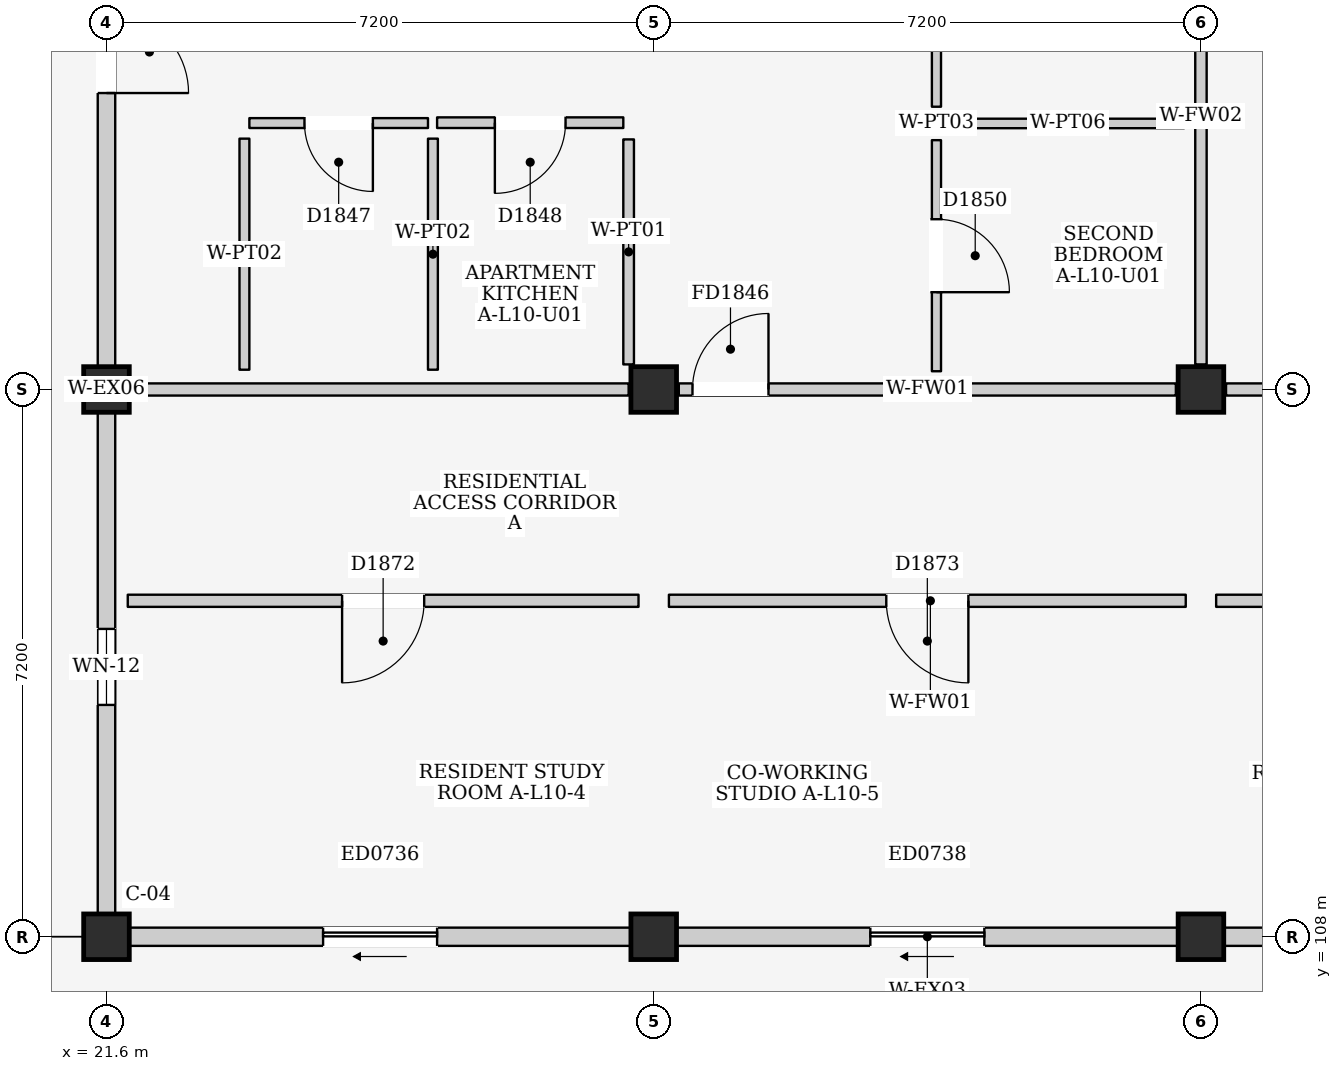
"""IFC4 building model, lengths in metres.
Left out: names, types, materials, properties, quantities, classifications, styles, units other than length and angle.
Written with IfcOpenShell. Run it as: python <this file> out.ifc"""

import sys

from ifc_helpers import new_model, si_unit, direction, frame, frame_2d, origin, origin_2d, place, context, subcontext, project, spatial, rectangle, extrude, element, fill, save


model = new_model("IFC4")
c1 = context("Model", 3, precision=1e-05, world=origin(), true_north=direction((0.0, 1.0)))
c2 = subcontext(c1, "Body", "Model", "MODEL_VIEW")
j1 = project(units=[si_unit("LENGTHUNIT", "METRE"), si_unit("PLANEANGLEUNIT", "RADIAN")], contexts=[c1])
p1 = place(None, origin())
s1 = spatial("IfcSite", under=j1, at=p1, CompositionType="ELEMENT")
p2 = place(p1, origin())
s2 = spatial("IfcBuilding", under=s1, at=p2, CompositionType="ELEMENT")
p3 = place(p2, frame((0.0, 0.0, 34.8)))
s3 = spatial("IfcBuildingStorey", under=s2, at=p3, CompositionType="ELEMENT", Elevation=34.8)
for number, where, z_axis, x_axis in (
    (1, (21.6, 108.0, 0.0), (0.0, 0.0, 1.0), (1.0, 0.0, 0.0)),
    (2, (21.6, 115.2, 0.0), (0.0, 0.0, 1.0), (1.0, 0.0, 0.0)),
    (3, (28.8, 108.0, 0.0), (0.0, 0.0, 1.0), (1.0, 0.0, 0.0)),
    (4, (28.8, 115.2, 0.0), (0.0, 0.0, 1.0), (1.0, 0.0, 0.0)),
    (5, (36.0, 108.0, 0.0), (0.0, 0.0, 1.0), (1.0, 0.0, 0.0)),
    (6, (36.0, 115.2, 0.0), (0.0, 0.0, 1.0), (1.0, 0.0, 0.0)),
):
    element("IfcColumn", number, at=place(p3, frame(where, z_axis=z_axis, x_axis=x_axis)), inside=s3, PredefinedType="COLUMN", context=c2, shape_type="SweptSolid", body=[
        extrude(rectangle(XDim=0.6, YDim=0.6, at=origin_2d()), origin(), (0.0, 0.0, 1.0), 3.2),
    ])
p4 = place(p3, frame((21.9, 108.0, 0.0), z_axis=(0.0, 0.0, 1.0), x_axis=(1.0, 0.0, 0.0)))
e7 = element("IfcWall", 7, at=p4, inside=s3, PredefinedType="ELEMENTEDWALL", context=c2, shape_type="SweptSolid", body=[
    extrude(rectangle(XDim=6.6, YDim=0.24, at=frame_2d((3.3, 0.0))), origin(), (0.0, 0.0, 1.0), 2.295),
])
p5 = place(p4, frame((2.55, 0.0, 0.0)))
e8 = element("IfcOpeningElement", 8, at=p5, cuts=e7, PredefinedType="OPENING", context=c2, shape_type="SweptSolid", body=[
    extrude(rectangle(XDim=1.5, YDim=2.12, at=frame_2d((0.75, 1.06))), frame((0.0, 0.135, 0.0), z_axis=(0.0, -1.0, 0.0), x_axis=(1.0, 0.0, 0.0)), (0.0, 0.0, 1.0), 0.27),
])
p6 = place(p3, frame((29.1, 108.0, 0.0), z_axis=(0.0, 0.0, 1.0), x_axis=(1.0, 0.0, 0.0)))
e9 = element("IfcWall", 9, at=p6, inside=s3, PredefinedType="ELEMENTEDWALL", context=c2, shape_type="SweptSolid", body=[
    extrude(rectangle(XDim=6.6, YDim=0.24, at=frame_2d((3.3, 0.0))), origin(), (0.0, 0.0, 1.0), 2.295),
])
p7 = place(p6, frame((2.55, 0.0, 0.0)))
e10 = element("IfcOpeningElement", 10, at=p7, cuts=e9, PredefinedType="OPENING", context=c2, shape_type="SweptSolid", body=[
    extrude(rectangle(XDim=1.5, YDim=2.12, at=frame_2d((0.75, 1.06))), frame((0.0, 0.135, 0.0), z_axis=(0.0, -1.0, 0.0), x_axis=(1.0, 0.0, 0.0)), (0.0, 0.0, 1.0), 0.27),
])
p8 = place(p3, frame((36.3, 108.0, 0.0), z_axis=(0.0, 0.0, 1.0), x_axis=(1.0, 0.0, 0.0)))
e11 = element("IfcWall", 11, at=p8, inside=s3, PredefinedType="ELEMENTEDWALL", context=c2, shape_type="SweptSolid", body=[
    extrude(rectangle(XDim=6.6, YDim=0.24, at=frame_2d((3.3, 0.0))), origin(), (0.0, 0.0, 1.0), 2.295),
])
p9 = place(p8, frame((2.55, 0.0, 0.0)))
e12 = element("IfcOpeningElement", 12, at=p9, cuts=e11, PredefinedType="OPENING", context=c2, shape_type="SweptSolid", body=[
    extrude(rectangle(XDim=1.5, YDim=2.12, at=frame_2d((0.75, 1.06))), frame((0.0, 0.135, 0.0), z_axis=(0.0, -1.0, 0.0), x_axis=(1.0, 0.0, 0.0)), (0.0, 0.0, 1.0), 0.27),
])
p10 = place(p3, frame((21.6, 108.3, 0.0), z_axis=(0.0, 0.0, 1.0), x_axis=(0.0, 1.0, 0.0)))
e13 = element("IfcWall", 13, at=p10, inside=s3, PredefinedType="ELEMENTEDWALL", context=c2, shape_type="SweptSolid", body=[
    extrude(rectangle(XDim=6.6, YDim=0.23, at=frame_2d((3.3, 0.0))), origin(), (0.0, 0.0, 1.0), 2.445),
])
p11 = place(p10, frame((2.75, 0.0, 1.1)))
e14 = element("IfcOpeningElement", 14, at=p11, cuts=e13, PredefinedType="OPENING", context=c2, shape_type="SweptSolid", body=[
    extrude(rectangle(XDim=1.0, YDim=0.9, at=frame_2d((0.5, 0.45))), frame((0.0, 0.13, 0.0), z_axis=(0.0, -1.0, 0.0), x_axis=(1.0, 0.0, 0.0)), (0.0, 0.0, 1.0), 0.26),
])
p12 = place(p3, frame((21.6, 115.5, 0.0), z_axis=(0.0, 0.0, 1.0), x_axis=(0.0, 1.0, 0.0)))
e15 = element("IfcWall", 15, at=p12, inside=s3, PredefinedType="ELEMENTEDWALL", context=c2, shape_type="SweptSolid", body=[
    extrude(rectangle(XDim=6.6, YDim=0.23, at=frame_2d((3.3, 0.0))), origin(), (0.0, 0.0, 1.0), 2.445),
])
p13 = place(p12, frame((3.6, 0.0, 0.0)))
e16 = element("IfcOpeningElement", 16, at=p13, cuts=e15, PredefinedType="OPENING", context=c2, shape_type="SweptSolid", body=[
    extrude(rectangle(XDim=1.08, YDim=2.12, at=frame_2d((0.54, 1.06))), frame((0.0, 0.13, 0.0), z_axis=(0.0, -1.0, 0.0), x_axis=(1.0, 0.0, 0.0)), (0.0, 0.0, 1.0), 0.26),
])
p14 = place(p3, frame((21.93, 115.2, 0.0), z_axis=(0.0, 0.0, 1.0), x_axis=(1.0, 0.0, 0.0)))
e17 = element("IfcWall", 17, at=p14, inside=s3, PredefinedType="PARTITIONING", context=c2, shape_type="SweptSolid", body=[
    extrude(rectangle(XDim=6.54, YDim=0.16, at=frame_2d((3.27, 0.0))), origin(), (0.0, 0.0, 1.0), 2.295),
])
p15 = place(p3, frame((29.13, 115.2, 0.0), z_axis=(0.0, 0.0, 1.0), x_axis=(1.0, 0.0, 0.0)))
e18 = element("IfcWall", 18, at=p15, inside=s3, PredefinedType="PARTITIONING", context=c2, shape_type="SweptSolid", body=[
    extrude(rectangle(XDim=6.54, YDim=0.16, at=frame_2d((3.27, 0.0))), origin(), (0.0, 0.0, 1.0), 2.295),
])
p16 = place(p15, frame((0.18, 0.0, 0.0)))
e19 = element("IfcOpeningElement", 19, at=p16, cuts=e18, PredefinedType="OPENING", context=c2, shape_type="SweptSolid", body=[
    extrude(rectangle(XDim=1.0, YDim=2.15, at=frame_2d((0.5, 1.075))), frame((0.0, 0.095, 0.0), z_axis=(0.0, -1.0, 0.0), x_axis=(1.0, 0.0, 0.0)), (0.0, 0.0, 1.0), 0.19),
])
p17 = place(p3, frame((36.0, 115.53, 0.0), z_axis=(0.0, 0.0, 1.0), x_axis=(0.0, 1.0, 0.0)))
e20 = element("IfcWall", 20, at=p17, inside=s3, PredefinedType="PARTITIONING", context=c2, shape_type="SweptSolid", body=[
    extrude(rectangle(XDim=6.54, YDim=0.15, at=frame_2d((3.27, 0.0))), origin(), (0.0, 0.0, 1.0), 2.445),
])
p18 = place(p3, frame((23.48, 118.705, 0.0), z_axis=(0.0, 0.0, 1.0), x_axis=(1.0, 0.0, 0.0)))
e21 = element("IfcWall", 21, at=p18, inside=s3, PredefinedType="PARTITIONING", context=c2, shape_type="SweptSolid", body=[
    extrude(rectangle(XDim=2.35, YDim=0.13, at=frame_2d((1.175, 0.0))), origin(), (0.0, 0.0, 1.0), 2.96),
])
p19 = place(p18, frame((0.725, 0.0, 0.0)))
e22 = element("IfcOpeningElement", 22, at=p19, cuts=e21, PredefinedType="OPENING", context=c2, shape_type="SweptSolid", body=[
    extrude(rectangle(XDim=0.9, YDim=2.1, at=frame_2d((0.45, 1.05))), frame((0.0, 0.08, 0.0), z_axis=(0.0, -1.0, 0.0), x_axis=(1.0, 0.0, 0.0)), (0.0, 0.0, 1.0), 0.16),
])
for number, where, z_axis, x_axis in (
    (23, (25.895, 115.46, 0.0), (0.0, 0.0, 1.0), (0.0, 1.0, 0.0)),
    (24, (23.415, 115.46, 0.0), (0.0, 0.0, 1.0), (0.0, 1.0, 0.0)),
):
    element("IfcWall", number, at=place(p3, frame(where, z_axis=z_axis, x_axis=x_axis)), inside=s3, PredefinedType="PARTITIONING", context=c2, shape_type="SweptSolid", body=[
        extrude(rectangle(XDim=3.04, YDim=0.13, at=frame_2d((1.52, 0.0))), origin(), (0.0, 0.0, 1.0), 2.96),
    ])
p20 = place(p3, frame((25.95, 118.71, 0.0), z_axis=(0.0, 0.0, 1.0), x_axis=(1.0, 0.0, 0.0)))
e25 = element("IfcWall", 25, at=p20, inside=s3, PredefinedType="PARTITIONING", context=c2, shape_type="SweptSolid", body=[
    extrude(rectangle(XDim=2.45, YDim=0.14, at=frame_2d((1.225, 0.0))), origin(), (0.0, 0.0, 1.0), 2.96),
])
p21 = place(p20, frame((0.76, 0.0, 0.0)))
e26 = element("IfcOpeningElement", 26, at=p21, cuts=e25, PredefinedType="OPENING", context=c2, shape_type="SweptSolid", body=[
    extrude(rectangle(XDim=0.93, YDim=2.14, at=frame_2d((0.465, 1.07))), frame((0.0, 0.085, 0.0), z_axis=(0.0, -1.0, 0.0), x_axis=(1.0, 0.0, 0.0)), (0.0, 0.0, 1.0), 0.17),
])
p22 = place(p3, frame((28.47, 115.53, 0.0), z_axis=(0.0, 0.0, 1.0), x_axis=(0.0, 1.0, 0.0)))
e27 = element("IfcWall", 27, at=p22, inside=s3, PredefinedType="PARTITIONING", context=c2, shape_type="SweptSolid", body=[
    extrude(rectangle(XDim=2.96, YDim=0.14, at=frame_2d((1.48, 0.0))), origin(), (0.0, 0.0, 1.0), 2.96),
])
p23 = place(p3, frame((32.52, 118.92, 0.0), z_axis=(0.0, 0.0, 1.0), x_axis=(0.0, 1.0, 0.0)))
e28 = element("IfcWall", 28, at=p23, inside=s3, PredefinedType="PARTITIONING", context=c2, shape_type="SweptSolid", body=[
    extrude(rectangle(XDim=3.04, YDim=0.12, at=frame_2d((1.52, 0.0))), origin(), (0.0, 0.0, 1.0), 2.96),
])
p24 = place(p23, frame((1.045, 0.0, 0.0)))
e29 = element("IfcOpeningElement", 29, at=p24, cuts=e28, PredefinedType="OPENING", context=c2, shape_type="SweptSolid", body=[
    extrude(rectangle(XDim=0.95, YDim=2.15, at=frame_2d((0.475, 1.075))), frame((0.0, 0.075, 0.0), z_axis=(0.0, -1.0, 0.0), x_axis=(1.0, 0.0, 0.0)), (0.0, 0.0, 1.0), 0.15),
])
p25 = place(p3, frame((32.72, 118.7, 0.0), z_axis=(0.0, 0.0, 1.0), x_axis=(1.0, 0.0, 0.0)))
e30 = element("IfcWall", 30, at=p25, inside=s3, PredefinedType="PARTITIONING", context=c2, shape_type="SweptSolid", body=[
    extrude(rectangle(XDim=3.06, YDim=0.125, at=frame_2d((1.53, 0.0))), origin(), (0.0, 0.0, 1.0), 2.96),
])
p26 = place(p3, frame((32.52, 115.44, 0.0), z_axis=(0.0, 0.0, 1.0), x_axis=(0.0, 1.0, 0.0)))
e31 = element("IfcWall", 31, at=p26, inside=s3, PredefinedType="PARTITIONING", context=c2, shape_type="SweptSolid", body=[
    extrude(rectangle(XDim=3.04, YDim=0.12, at=frame_2d((1.52, 0.0))), origin(), (0.0, 0.0, 1.0), 2.96),
])
p27 = place(p26, frame((1.04, 0.0, 0.0)))
e32 = element("IfcOpeningElement", 32, at=p27, cuts=e31, PredefinedType="OPENING", context=c2, shape_type="SweptSolid", body=[
    extrude(rectangle(XDim=0.96, YDim=2.15, at=frame_2d((0.48, 1.075))), frame((0.0, 0.075, 0.0), z_axis=(0.0, -1.0, 0.0), x_axis=(1.0, 0.0, 0.0)), (0.0, 0.0, 1.0), 0.15),
])
p28 = place(p3, frame((36.33, 115.2, 0.0), z_axis=(0.0, 0.0, 1.0), x_axis=(1.0, 0.0, 0.0)))
e33 = element("IfcWall", 33, at=p28, inside=s3, PredefinedType="PARTITIONING", context=c2, shape_type="SweptSolid", body=[
    extrude(rectangle(XDim=6.54, YDim=0.16, at=frame_2d((3.27, 0.0))), origin(), (0.0, 0.0, 1.0), 2.295),
])
p29 = place(p28, frame((2.745, 0.0, 0.0)))
e34 = element("IfcOpeningElement", 34, at=p29, cuts=e33, PredefinedType="OPENING", context=c2, shape_type="SweptSolid", body=[
    extrude(rectangle(XDim=1.05, YDim=2.15, at=frame_2d((0.525, 1.075))), frame((0.0, 0.095, 0.0), z_axis=(0.0, -1.0, 0.0), x_axis=(1.0, 0.0, 0.0)), (0.0, 0.0, 1.0), 0.19),
])
p30 = place(p3, frame((21.88, 112.42, 0.0), z_axis=(0.0, 0.0, 1.0), x_axis=(1.0, 0.0, 0.0)))
e35 = element("IfcWall", 35, at=p30, inside=s3, PredefinedType="PARTITIONING", context=c2, shape_type="SweptSolid", body=[
    extrude(rectangle(XDim=6.72, YDim=0.16, at=frame_2d((3.36, 0.0))), origin(), (0.0, 0.0, 1.0), 2.96),
])
p31 = place(p30, frame((2.82, 0.0, 0.0)))
e36 = element("IfcOpeningElement", 36, at=p31, cuts=e35, PredefinedType="OPENING", context=c2, shape_type="SweptSolid", body=[
    extrude(rectangle(XDim=1.08, YDim=2.22, at=frame_2d((0.54, 1.11))), frame((0.0, 0.095, 0.0), z_axis=(0.0, -1.0, 0.0), x_axis=(1.0, 0.0, 0.0)), (0.0, 0.0, 1.0), 0.19),
])
p32 = place(p3, frame((29.0, 112.42, 0.0), z_axis=(0.0, 0.0, 1.0), x_axis=(1.0, 0.0, 0.0)))
e37 = element("IfcWall", 37, at=p32, inside=s3, PredefinedType="PARTITIONING", context=c2, shape_type="SweptSolid", body=[
    extrude(rectangle(XDim=6.8, YDim=0.16, at=frame_2d((3.4, 0.0))), origin(), (0.0, 0.0, 1.0), 2.96),
])
p33 = place(p32, frame((2.86, 0.0, 0.0)))
e38 = element("IfcOpeningElement", 38, at=p33, cuts=e37, PredefinedType="OPENING", context=c2, shape_type="SweptSolid", body=[
    extrude(rectangle(XDim=1.08, YDim=2.22, at=frame_2d((0.54, 1.11))), frame((0.0, 0.095, 0.0), z_axis=(0.0, -1.0, 0.0), x_axis=(1.0, 0.0, 0.0)), (0.0, 0.0, 1.0), 0.19),
])
p34 = place(p3, frame((36.2, 112.42, 0.0), z_axis=(0.0, 0.0, 1.0), x_axis=(1.0, 0.0, 0.0)))
e39 = element("IfcWall", 39, at=p34, inside=s3, PredefinedType="PARTITIONING", context=c2, shape_type="SweptSolid", body=[
    extrude(rectangle(XDim=6.8, YDim=0.16, at=frame_2d((3.4, 0.0))), origin(), (0.0, 0.0, 1.0), 2.96),
])
p35 = place(p34, frame((2.86, 0.0, 0.0)))
e40 = element("IfcOpeningElement", 40, at=p35, cuts=e39, PredefinedType="OPENING", context=c2, shape_type="SweptSolid", body=[
    extrude(rectangle(XDim=1.08, YDim=2.22, at=frame_2d((0.54, 1.11))), frame((0.0, 0.095, 0.0), z_axis=(0.0, -1.0, 0.0), x_axis=(1.0, 0.0, 0.0)), (0.0, 0.0, 1.0), 0.19),
])
p36 = place(p5, frame((1.5, 0.0, 0.0), z_axis=(0.0, 0.0, 1.0), x_axis=(-1.0, 0.0, 0.0)))
e41 = element("IfcDoor", 41, at=p36, inside=s3, OperationType="SLIDING_TO_LEFT", PredefinedType="DOOR", context=c2, shape_type="SweptSolid", body=[
    extrude(rectangle(XDim=1.5, YDim=2.12, at=frame_2d((0.75, 1.06))), frame((0.0, 0.025, 0.0), z_axis=(0.0, -1.0, 0.0), x_axis=(1.0, 0.0, 0.0)), (0.0, 0.0, 1.0), 0.05),
])
fill(e8, e41)
p37 = place(p7, frame((1.5, 0.0, 0.0), z_axis=(0.0, 0.0, 1.0), x_axis=(-1.0, 0.0, 0.0)))
e42 = element("IfcDoor", 42, at=p37, inside=s3, OperationType="SLIDING_TO_LEFT", PredefinedType="DOOR", context=c2, shape_type="SweptSolid", body=[
    extrude(rectangle(XDim=1.5, YDim=2.12, at=frame_2d((0.75, 1.06))), frame((0.0, 0.025, 0.0), z_axis=(0.0, -1.0, 0.0), x_axis=(1.0, 0.0, 0.0)), (0.0, 0.0, 1.0), 0.05),
])
fill(e10, e42)
p38 = place(p11, origin())
e43 = element("IfcWindow", 43, at=p38, inside=s3, PartitioningType="SINGLE_PANEL", PredefinedType="WINDOW", context=c2, shape_type="SweptSolid", body=[
    extrude(rectangle(XDim=1.0, YDim=0.9, at=frame_2d((0.5, 0.45))), frame((0.0, 0.03, 0.0), z_axis=(0.0, -1.0, 0.0), x_axis=(1.0, 0.0, 0.0)), (0.0, 0.0, 1.0), 0.06),
])
fill(e14, e43)
p39 = place(p13, frame((1.08, 0.0, 0.0), z_axis=(0.0, 0.0, 1.0), x_axis=(-1.0, 0.0, 0.0)))
e44 = element("IfcDoor", 44, at=p39, inside=s3, OperationType="SINGLE_SWING_RIGHT", PredefinedType="DOOR", context=c2, shape_type="SweptSolid", body=[
    extrude(rectangle(XDim=1.08, YDim=2.12, at=frame_2d((0.54, 1.06))), frame((0.0, 0.025, 0.0), z_axis=(0.0, -1.0, 0.0), x_axis=(1.0, 0.0, 0.0)), (0.0, 0.0, 1.0), 0.05),
])
fill(e16, e44)
p40 = place(p16, origin())
e45 = element("IfcDoor", 45, at=p40, inside=s3, OperationType="SINGLE_SWING_RIGHT", PredefinedType="DOOR", context=c2, shape_type="SweptSolid", body=[
    extrude(rectangle(XDim=1.0, YDim=2.15, at=frame_2d((0.5, 1.075))), frame((0.0, 0.025, 0.0), z_axis=(0.0, -1.0, 0.0), x_axis=(1.0, 0.0, 0.0)), (0.0, 0.0, 1.0), 0.05),
])
fill(e19, e45)
p41 = place(p19, frame((0.9, 0.0, 0.0), z_axis=(0.0, 0.0, 1.0), x_axis=(-1.0, 0.0, 0.0)))
e46 = element("IfcDoor", 46, at=p41, inside=s3, OperationType="SINGLE_SWING_LEFT", PredefinedType="DOOR", context=c2, shape_type="SweptSolid", body=[
    extrude(rectangle(XDim=0.9, YDim=2.1, at=frame_2d((0.45, 1.05))), frame((0.0, 0.025, 0.0), z_axis=(0.0, -1.0, 0.0), x_axis=(1.0, 0.0, 0.0)), (0.0, 0.0, 1.0), 0.05),
])
fill(e22, e46)
p42 = place(p21, frame((0.93, 0.0, 0.0), z_axis=(0.0, 0.0, 1.0), x_axis=(-1.0, 0.0, 0.0)))
e47 = element("IfcDoor", 47, at=p42, inside=s3, OperationType="SINGLE_SWING_RIGHT", PredefinedType="DOOR", context=c2, shape_type="SweptSolid", body=[
    extrude(rectangle(XDim=0.93, YDim=2.14, at=frame_2d((0.465, 1.07))), frame((0.0, 0.025, 0.0), z_axis=(0.0, -1.0, 0.0), x_axis=(1.0, 0.0, 0.0)), (0.0, 0.0, 1.0), 0.05),
])
fill(e26, e47)
p43 = place(p27, frame((0.96, 0.0, 0.0), z_axis=(0.0, 0.0, 1.0), x_axis=(-1.0, 0.0, 0.0)))
e48 = element("IfcDoor", 48, at=p43, inside=s3, OperationType="SINGLE_SWING_RIGHT", PredefinedType="DOOR", context=c2, shape_type="SweptSolid", body=[
    extrude(rectangle(XDim=0.96, YDim=2.15, at=frame_2d((0.48, 1.075))), frame((0.0, 0.025, 0.0), z_axis=(0.0, -1.0, 0.0), x_axis=(1.0, 0.0, 0.0)), (0.0, 0.0, 1.0), 0.05),
])
fill(e32, e48)
p44 = place(p31, frame((1.08, 0.0, 0.0), z_axis=(0.0, 0.0, 1.0), x_axis=(-1.0, 0.0, 0.0)))
e49 = element("IfcDoor", 49, at=p44, inside=s3, OperationType="SINGLE_SWING_RIGHT", PredefinedType="DOOR", context=c2, shape_type="SweptSolid", body=[
    extrude(rectangle(XDim=1.08, YDim=2.22, at=frame_2d((0.54, 1.11))), frame((0.0, 0.025, 0.0), z_axis=(0.0, -1.0, 0.0), x_axis=(1.0, 0.0, 0.0)), (0.0, 0.0, 1.0), 0.05),
])
fill(e36, e49)
p45 = place(p33, frame((1.08, 0.0, 0.0), z_axis=(0.0, 0.0, 1.0), x_axis=(-1.0, 0.0, 0.0)))
e50 = element("IfcDoor", 50, at=p45, inside=s3, OperationType="SINGLE_SWING_LEFT", PredefinedType="DOOR", context=c2, shape_type="SweptSolid", body=[
    extrude(rectangle(XDim=1.08, YDim=2.22, at=frame_2d((0.54, 1.11))), frame((0.0, 0.025, 0.0), z_axis=(0.0, -1.0, 0.0), x_axis=(1.0, 0.0, 0.0)), (0.0, 0.0, 1.0), 0.05),
])
fill(e38, e50)
save(model, sys.argv[1])
